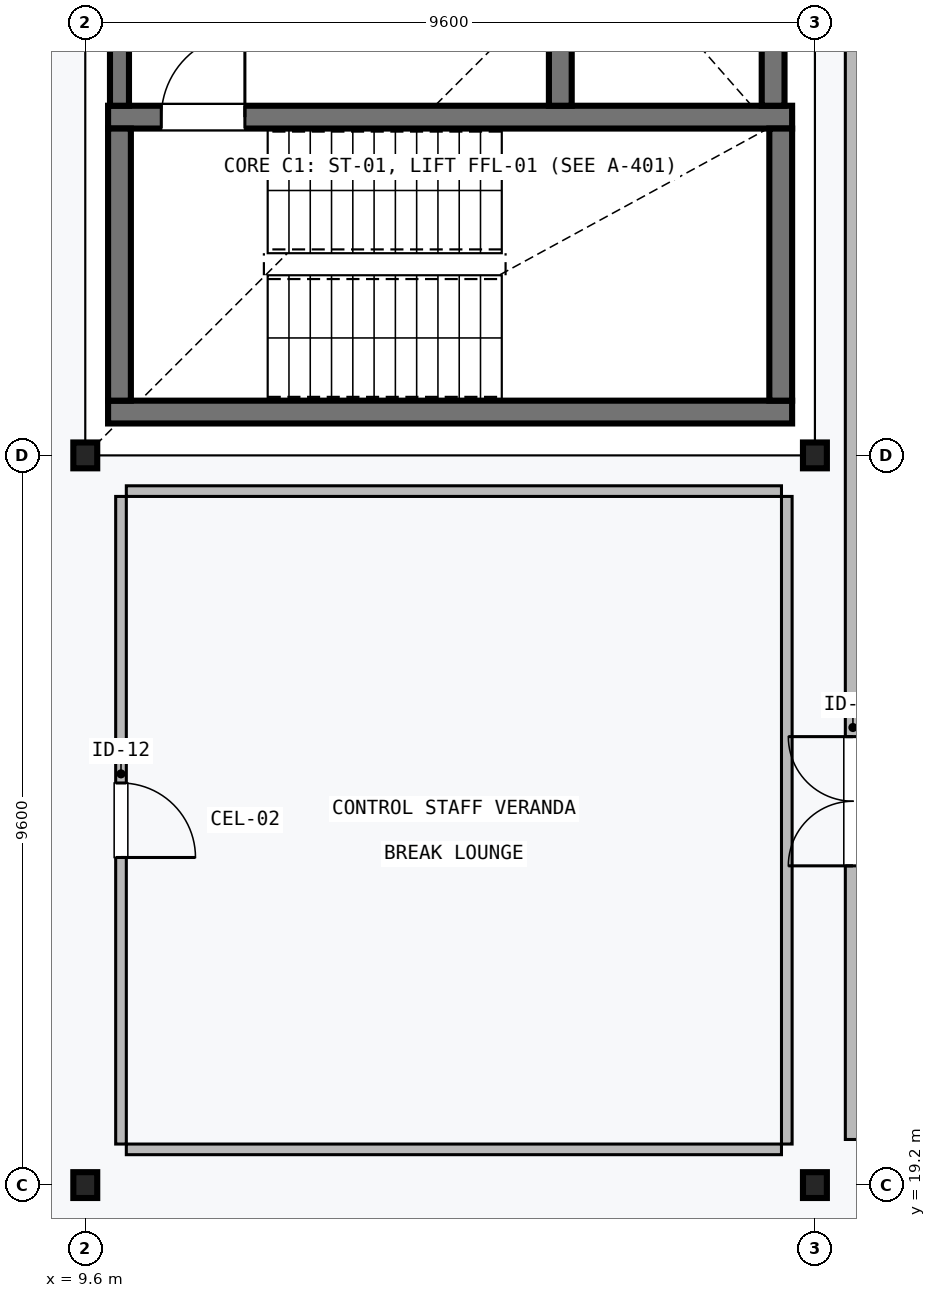
"""IFC4 building model, lengths in metres.
Left out: names, types, materials, properties, quantities, classifications, styles, units other than length and angle.
Written with IfcOpenShell. Run it as: python <this file> out.ifc"""

import sys

from ifc_helpers import new_model, si_unit, direction, frame, frame_2d, origin, origin_2d, place, context, subcontext, project, spatial, rectangle, i_section, extrude, element, fill, save


model = new_model("IFC4")
c1 = context("Model", 3, precision=1e-05, world=origin(), true_north=direction((0.0, 1.0)))
c2 = subcontext(c1, "Body", "Model", "MODEL_VIEW")
j1 = project(units=[si_unit("LENGTHUNIT", "METRE"), si_unit("PLANEANGLEUNIT", "RADIAN")], contexts=[c1])
p1 = place(None, origin())
s1 = spatial("IfcSite", under=j1, at=p1, CompositionType="ELEMENT")
p2 = place(p1, origin())
s2 = spatial("IfcBuilding", under=s1, at=p2, CompositionType="ELEMENT")
p3 = place(p2, frame((0.0, 0.0, 10.5)))
s3 = spatial("IfcBuildingStorey", under=s2, at=p3, CompositionType="ELEMENT", Elevation=10.5)
for number, where, z_axis, x_axis in (
    (1, (9.6, 19.2, 0.0), (0.0, 0.0, 1.0), (1.0, 0.0, 0.0)),
    (2, (9.6, 28.8, 0.0), (0.0, 0.0, 1.0), (1.0, 0.0, 0.0)),
    (3, (19.2, 19.2, 0.0), (0.0, 0.0, 1.0), (1.0, 0.0, 0.0)),
    (4, (19.2, 28.8, 0.0), (0.0, 0.0, 1.0), (1.0, 0.0, 0.0)),
):
    element("IfcColumn", number, at=place(p3, frame(where, z_axis=z_axis, x_axis=x_axis)), inside=s3, PredefinedType="COLUMN", context=c2, shape_type="SweptSolid", body=[
        extrude(i_section(OverallWidth=0.314, OverallDepth=0.34, WebThickness=0.019, FlangeThickness=0.031, FilletRadius=0.015, at=origin_2d()), origin(), (0.0, 0.0, 1.0), 3.95),
    ])
p4 = place(p3, frame((9.9, 29.37, 0.0), z_axis=(0.0, 0.0, 1.0), x_axis=(1.0, 0.0, 0.0)))
e5 = element("IfcWall", 5, at=p4, inside=s3, PredefinedType="SHEAR", context=c2, shape_type="SweptSolid", body=[
    extrude(rectangle(XDim=9.0, YDim=0.3, at=frame_2d((4.5, 0.0))), origin(), (0.0, 0.0, 1.0), 3.95),
])
p5 = place(p3, frame((18.9, 33.25, 0.0), z_axis=(0.0, 0.0, 1.0), x_axis=(-1.0, 0.0, 0.0)))
e6 = element("IfcWall", 6, at=p5, inside=s3, PredefinedType="SHEAR", context=c2, shape_type="SweptSolid", body=[
    extrude(rectangle(XDim=9.0, YDim=0.3, at=frame_2d((4.5, 0.0))), origin(), (0.0, 0.0, 1.0), 3.95),
])
p6 = place(p5, frame((7.2, 0.0, 0.0)))
e7 = element("IfcOpeningElement", 7, at=p6, cuts=e6, PredefinedType="OPENING", context=c2, shape_type="SweptSolid", body=[
    extrude(rectangle(XDim=1.1, YDim=2.15, at=frame_2d((0.55, 1.075))), frame((0.0, 0.16, 0.0), z_axis=(0.0, -1.0, 0.0), x_axis=(1.0, 0.0, 0.0)), (0.0, 0.0, 1.0), 0.32),
])
for number, where, z_axis, x_axis in (
    (8, (10.05, 29.52, 0.0), (0.0, 0.0, 1.0), (0.0, 1.0, 0.0)),
    (9, (18.75, 33.1, 0.0), (0.0, 0.0, 1.0), (0.0, -1.0, 0.0)),
):
    element("IfcWall", number, at=place(p3, frame(where, z_axis=z_axis, x_axis=x_axis)), inside=s3, PredefinedType="SHEAR", context=c2, shape_type="SweptSolid", body=[
        extrude(rectangle(XDim=3.58, YDim=0.3, at=frame_2d((1.79, 0.0))), origin(), (0.0, 0.0, 1.0), 3.95),
    ])
p7 = place(p3, frame((15.85, 36.1, 0.0), z_axis=(0.0, 0.0, 1.0), x_axis=(0.0, -1.0, 0.0)))
e10 = element("IfcWall", 10, at=p7, inside=s3, PredefinedType="SHEAR", context=c2, shape_type="SweptSolid", body=[
    extrude(rectangle(XDim=2.7, YDim=0.3, at=frame_2d((1.35, 0.0))), origin(), (0.0, 0.0, 1.0), 3.95),
])
p8 = place(p7, frame((0.8, 0.0, 0.0)))
e11 = element("IfcOpeningElement", 11, at=p8, cuts=e10, PredefinedType="OPENING", context=c2, shape_type="SweptSolid", body=[
    extrude(rectangle(XDim=1.1, YDim=2.1, at=frame_2d((0.55, 1.05))), frame((0.0, 0.16, 0.0), z_axis=(0.0, -1.0, 0.0), x_axis=(1.0, 0.0, 0.0)), (0.0, 0.0, 1.0), 0.32),
])
p9 = place(p3, frame((18.65, 33.4, 0.0), z_axis=(0.0, 0.0, 1.0), x_axis=(0.0, 1.0, 0.0)))
e12 = element("IfcWall", 12, at=p9, inside=s3, PredefinedType="SHEAR", context=c2, shape_type="SweptSolid", body=[
    extrude(rectangle(XDim=2.7, YDim=0.3, at=frame_2d((1.35, 0.0))), origin(), (0.0, 0.0, 1.0), 3.95),
])
p10 = place(p3, frame((10.05, 33.4, 0.0), z_axis=(0.0, 0.0, 1.0), x_axis=(0.0, 1.0, 0.0)))
e13 = element("IfcWall", 13, at=p10, inside=s3, PredefinedType="SHEAR", context=c2, shape_type="SweptSolid", body=[
    extrude(rectangle(XDim=2.7, YDim=0.25, at=frame_2d((1.35, 0.0))), origin(), (0.0, 0.0, 1.0), 3.95),
])
p11 = place(p10, frame((0.75, 0.0, 0.0)))
e14 = element("IfcOpeningElement", 14, at=p11, cuts=e13, PredefinedType="OPENING", context=c2, shape_type="SweptSolid", body=[
    extrude(rectangle(XDim=1.2, YDim=2.15, at=frame_2d((0.6, 1.075))), frame((0.0, 0.135, 0.0), z_axis=(0.0, -1.0, 0.0), x_axis=(1.0, 0.0, 0.0)), (0.0, 0.0, 1.0), 0.27),
])
p12 = place(p3, frame((19.7, 19.8, 0.0), z_axis=(0.0, 0.0, 1.0), x_axis=(0.0, 1.0, 0.0)))
e15 = element("IfcWall", 15, at=p12, inside=s3, PredefinedType="PARTITIONING", context=c2, shape_type="SweptSolid", body=[
    extrude(rectangle(XDim=27.5, YDim=0.2, at=frame_2d((13.75, 0.0))), origin(), (0.0, 0.0, 1.0), 3.333),
])
p13 = place(p12, frame((3.6, 0.0, 0.0)))
e16 = element("IfcOpeningElement", 16, at=p13, cuts=e15, PredefinedType="OPENING", context=c2, shape_type="SweptSolid", body=[
    extrude(rectangle(XDim=1.7, YDim=2.3, at=frame_2d((0.85, 1.15))), frame((0.0, 0.11, 0.0), z_axis=(0.0, -1.0, 0.0), x_axis=(1.0, 0.0, 0.0)), (0.0, 0.0, 1.0), 0.22),
])
for number, where, z_axis, x_axis in (
    (17, (18.76, 19.67, 0.0), (0.0, 0.0, 1.0), (-1.0, 0.0, 0.0)),
    (18, (10.14, 28.33, 0.0), (0.0, 0.0, 1.0), (1.0, 0.0, 0.0)),
):
    element("IfcWall", number, at=place(p3, frame(where, z_axis=z_axis, x_axis=x_axis)), inside=s3, PredefinedType="PARTITIONING", context=c2, shape_type="SweptSolid", body=[
        extrude(rectangle(XDim=8.62, YDim=0.14, at=frame_2d((4.31, 0.0))), origin(), (0.0, 0.0, 1.0), 3.59),
    ])
p14 = place(p3, frame((10.07, 19.74, 0.0), z_axis=(0.0, 0.0, 1.0), x_axis=(0.0, 1.0, 0.0)))
e19 = element("IfcWall", 19, at=p14, inside=s3, PredefinedType="PARTITIONING", context=c2, shape_type="SweptSolid", body=[
    extrude(rectangle(XDim=8.52, YDim=0.14, at=frame_2d((4.26, 0.0))), origin(), (0.0, 0.0, 1.0), 3.59),
])
p15 = place(p14, frame((3.77, 0.0, 0.0)))
e20 = element("IfcOpeningElement", 20, at=p15, cuts=e19, PredefinedType="OPENING", context=c2, shape_type="SweptSolid", body=[
    extrude(rectangle(XDim=0.98, YDim=2.15, at=frame_2d((0.49, 1.075))), frame((0.0, 0.08, 0.0), z_axis=(0.0, -1.0, 0.0), x_axis=(1.0, 0.0, 0.0)), (0.0, 0.0, 1.0), 0.16),
])
p16 = place(p3, frame((18.83, 28.26, 0.0), z_axis=(0.0, 0.0, 1.0), x_axis=(0.0, -1.0, 0.0)))
e21 = element("IfcWall", 21, at=p16, inside=s3, PredefinedType="PARTITIONING", context=c2, shape_type="SweptSolid", body=[
    extrude(rectangle(XDim=8.52, YDim=0.14, at=frame_2d((4.26, 0.0))), origin(), (0.0, 0.0, 1.0), 3.59),
])
p17 = place(p6, frame((1.1, 0.0, 0.0), z_axis=(0.0, 0.0, 1.0), x_axis=(-1.0, 0.0, 0.0)))
e22 = element("IfcDoor", 22, at=p17, inside=s3, OperationType="SINGLE_SWING_LEFT", PredefinedType="DOOR", context=c2, shape_type="SweptSolid", body=[
    extrude(rectangle(XDim=1.1, YDim=2.15, at=frame_2d((0.55, 1.075))), frame((0.0, 0.025, 0.0), z_axis=(0.0, -1.0, 0.0), x_axis=(1.0, 0.0, 0.0)), (0.0, 0.0, 1.0), 0.05),
])
fill(e7, e22)
p18 = place(p13, origin())
e23 = element("IfcDoor", 23, at=p18, inside=s3, OperationType="DOUBLE_DOOR_SINGLE_SWING", PredefinedType="DOOR", context=c2, shape_type="SweptSolid", body=[
    extrude(rectangle(XDim=1.7, YDim=2.3, at=frame_2d((0.85, 1.15))), frame((0.0, 0.025, 0.0), z_axis=(0.0, -1.0, 0.0), x_axis=(1.0, 0.0, 0.0)), (0.0, 0.0, 1.0), 0.05),
])
fill(e16, e23)
p19 = place(p15, frame((0.98, 0.0, 0.0), z_axis=(0.0, 0.0, 1.0), x_axis=(-1.0, 0.0, 0.0)))
e24 = element("IfcDoor", 24, at=p19, inside=s3, OperationType="SINGLE_SWING_LEFT", PredefinedType="DOOR", context=c2, shape_type="SweptSolid", body=[
    extrude(rectangle(XDim=0.98, YDim=2.15, at=frame_2d((0.49, 1.075))), frame((0.0, 0.025, 0.0), z_axis=(0.0, -1.0, 0.0), x_axis=(1.0, 0.0, 0.0)), (0.0, 0.0, 1.0), 0.05),
])
fill(e20, e24)
save(model, sys.argv[1])
